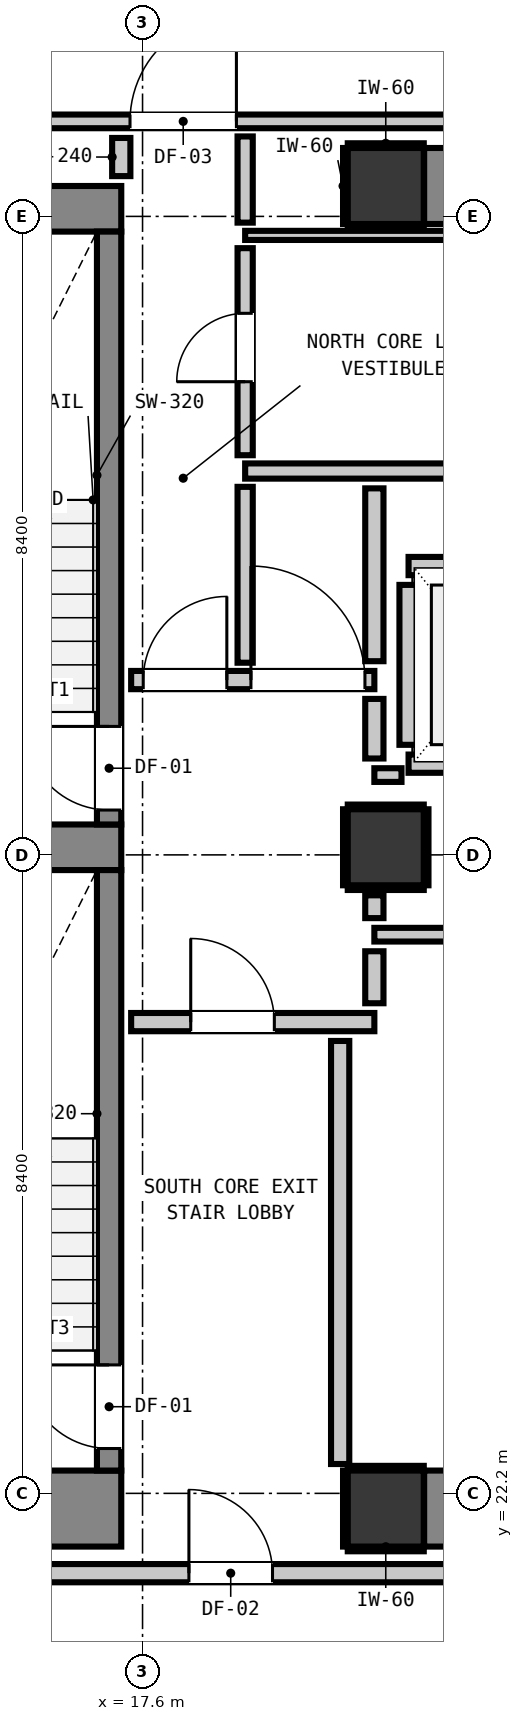
"""IFC4 building model, lengths in metres.
Left out: names, types, materials, properties, quantities, classifications, styles, units other than length and angle.
Written with IfcOpenShell. Run it as: python <this file> out.ifc"""

import sys

from ifc_helpers import new_model, si_unit, direction, frame, frame_2d, origin, origin_2d, place, context, subcontext, project, spatial, rectangle, extrude, element, fill, save


model = new_model("IFC4")
c1 = context("Model", 3, precision=1e-05, world=origin(), true_north=direction((0.0, 1.0)))
c2 = subcontext(c1, "Body", "Model", "MODEL_VIEW")
j1 = project(units=[si_unit("LENGTHUNIT", "METRE"), si_unit("PLANEANGLEUNIT", "RADIAN")], contexts=[c1])
p1 = place(None, origin())
s1 = spatial("IfcSite", under=j1, at=p1, CompositionType="ELEMENT")
p2 = place(p1, origin())
s2 = spatial("IfcBuilding", under=s1, at=p2, CompositionType="ELEMENT")
p3 = place(p2, frame((0.0, 0.0, 129.32)))
s3 = spatial("IfcBuildingStorey", under=s2, at=p3, CompositionType="ELEMENT", Elevation=129.32)
for number, where, z_axis, x_axis in (
    (1, (20.8, 22.0, 0.0), (0.0, 0.0, 1.0), (1.0, 0.0, 0.0)),
    (2, (20.8, 39.4, 0.0), (0.0, 0.0, 1.0), (1.0, 0.0, 0.0)),
):
    element("IfcColumn", number, at=place(p3, frame(where, z_axis=z_axis, x_axis=x_axis)), inside=s3, PredefinedType="COLUMN", context=c2, shape_type="SweptSolid", body=[
        extrude(rectangle(XDim=1.0, YDim=1.0, at=origin_2d()), origin(), (0.0, 0.0, 1.0), 3.32),
    ])
p4 = place(p3, frame((13.24, 22.0, 0.0), z_axis=(0.0, 0.0, 1.0), x_axis=(1.0, 0.0, 0.0)))
e3 = element("IfcWall", 3, at=p4, inside=s3, PredefinedType="SHEAR", context=c2, shape_type="SweptSolid", body=[
    extrude(rectangle(XDim=4.08, YDim=1.0, at=frame_2d((2.04, 0.0))), origin(), (0.0, 0.0, 1.0), 3.32),
])
p5 = place(p3, frame((13.24, 39.1, 0.0), z_axis=(0.0, 0.0, 1.0), x_axis=(1.0, 0.0, 0.0)))
e4 = element("IfcWall", 4, at=p5, inside=s3, PredefinedType="SHEAR", context=c2, shape_type="SweptSolid", body=[
    extrude(rectangle(XDim=4.08, YDim=0.6, at=frame_2d((2.04, 0.0))), origin(), (0.0, 0.0, 1.0), 3.32),
])
p6 = place(p3, frame((13.905, 30.7, 0.0), z_axis=(0.0, 0.0, 1.0), x_axis=(1.0, 0.0, 0.0)))
e5 = element("IfcWall", 5, at=p6, inside=s3, PredefinedType="SHEAR", context=c2, shape_type="SweptSolid", body=[
    extrude(rectangle(XDim=3.415, YDim=0.6, at=frame_2d((1.708, 0.0))), origin(), (0.0, 0.0, 1.0), 3.32),
])
for number, where, z_axis, x_axis in (
    (6, (21.305, 22.0, 0.0), (0.0, 0.0, 1.0), (1.0, 0.0, 0.0)),
    (7, (21.305, 39.4, 0.0), (0.0, 0.0, 1.0), (1.0, 0.0, 0.0)),
):
    element("IfcWall", number, at=place(p3, frame(where, z_axis=z_axis, x_axis=x_axis)), inside=s3, PredefinedType="SHEAR", context=c2, shape_type="SweptSolid", body=[
        extrude(rectangle(XDim=7.39, YDim=1.0, at=frame_2d((3.695, 0.0))), origin(), (0.0, 0.0, 1.0), 3.32),
    ])
p7 = place(p3, frame((17.16, 31.0, 0.0), z_axis=(0.0, 0.0, 1.0), x_axis=(0.0, 1.0, 0.0)))
e8 = element("IfcWall", 8, at=p7, inside=s3, PredefinedType="SHEAR", context=c2, shape_type="SweptSolid", body=[
    extrude(rectangle(XDim=7.8, YDim=0.32, at=frame_2d((3.9, 0.0))), origin(), (0.0, 0.0, 1.0), 3.32),
])
p8 = place(p7, frame((0.19, 0.0, 0.0)))
e9 = element("IfcOpeningElement", 9, at=p8, cuts=e8, PredefinedType="OPENING", context=c2, shape_type="SweptSolid", body=[
    extrude(rectangle(XDim=1.1, YDim=2.15, at=frame_2d((0.55, 1.075))), frame((0.0, 0.17, 0.0), z_axis=(0.0, -1.0, 0.0), x_axis=(1.0, 0.0, 0.0)), (0.0, 0.0, 1.0), 0.34),
])
p9 = place(p3, frame((17.16, 22.5, 0.0), z_axis=(0.0, 0.0, 1.0), x_axis=(0.0, 1.0, 0.0)))
e10 = element("IfcWall", 10, at=p9, inside=s3, PredefinedType="SHEAR", context=c2, shape_type="SweptSolid", body=[
    extrude(rectangle(XDim=7.9, YDim=0.32, at=frame_2d((3.95, 0.0))), origin(), (0.0, 0.0, 1.0), 3.32),
])
p10 = place(p9, frame((0.29, 0.0, 0.0)))
e11 = element("IfcOpeningElement", 11, at=p10, cuts=e10, PredefinedType="OPENING", context=c2, shape_type="SweptSolid", body=[
    extrude(rectangle(XDim=1.1, YDim=2.15, at=frame_2d((0.55, 1.075))), frame((0.0, 0.17, 0.0), z_axis=(0.0, -1.0, 0.0), x_axis=(1.0, 0.0, 0.0)), (0.0, 0.0, 1.0), 0.34),
])
p11 = place(p3, frame((20.8, 30.7, 0.0), z_axis=(0.0, 0.0, 1.0), x_axis=(1.0, 0.0, 0.0)))
e12 = element("IfcColumn", 12, at=p11, inside=s3, PredefinedType="COLUMN", context=c2, shape_type="SweptSolid", body=[
    extrude(rectangle(XDim=1.0, YDim=1.0, at=origin_2d()), origin(), (0.0, 0.0, 1.0), 3.32),
])
for number, where, z_axis, x_axis in (
    (13, (21.1, 31.8, 0.0), (0.0, 0.0, 1.0), (1.0, 0.0, 0.0)),
    (14, (21.1, 34.4, 0.0), (0.0, 0.0, 1.0), (1.0, 0.0, 0.0)),
):
    element("IfcWall", number, at=place(p3, frame(where, z_axis=z_axis, x_axis=x_axis)), inside=s3, PredefinedType="PARTITIONING", context=c2, shape_type="SweptSolid", body=[
        extrude(rectangle(XDim=2.2, YDim=0.24, at=frame_2d((1.1, 0.0))), origin(), (0.0, 0.0, 1.0), 3.08),
    ])
p12 = place(p3, frame((21.1, 32.048, 0.0), z_axis=(0.0, 0.0, 1.0), x_axis=(0.0, 1.0, 0.0)))
e15 = element("IfcWall", 15, at=p12, inside=s3, PredefinedType="PARTITIONING", context=c2, shape_type="SweptSolid", body=[
    extrude(rectangle(XDim=2.104, YDim=0.24, at=frame_2d((1.052, 0.0))), origin(), (0.0, 0.0, 1.0), 2.315),
])
p13 = place(p3, frame((9.407, 21.15, 0.0), z_axis=(0.0, 0.0, 1.0), x_axis=(1.0, 0.0, 0.0)))
e16 = element("IfcWall", 16, at=p13, inside=s3, PredefinedType="PARTITIONING", context=c2, shape_type="SweptSolid", body=[
    extrude(rectangle(XDim=39.386, YDim=0.24, at=frame_2d((19.693, 0.0))), origin(), (0.0, 0.0, 1.0), 3.08),
])
p14 = place(p13, frame((8.803, 0.0, 0.0)))
e17 = element("IfcOpeningElement", 17, at=p14, cuts=e16, PredefinedType="OPENING", context=c2, shape_type="SweptSolid", body=[
    extrude(rectangle(XDim=1.1, YDim=2.15, at=frame_2d((0.55, 1.075))), frame((0.0, 0.13, 0.0), z_axis=(0.0, -1.0, 0.0), x_axis=(1.0, 0.0, 0.0)), (0.0, 0.0, 1.0), 0.26),
])
p15 = place(p13, frame((1.192, 0.0, 0.0)))
e18 = element("IfcOpeningElement", 18, at=p15, cuts=e16, PredefinedType="OPENING", context=c2, shape_type="SweptSolid", body=[
    extrude(rectangle(XDim=1.4, YDim=2.15, at=frame_2d((0.7, 1.075))), frame((0.0, 0.13, 0.0), z_axis=(0.0, -1.0, 0.0), x_axis=(1.0, 0.0, 0.0)), (0.0, 0.0, 1.0), 0.26),
])
p16 = place(p13, frame((28.643, 0.0, 0.0)))
e19 = element("IfcOpeningElement", 19, at=p16, cuts=e16, PredefinedType="OPENING", context=c2, shape_type="SweptSolid", body=[
    extrude(rectangle(XDim=1.4, YDim=2.15, at=frame_2d((0.7, 1.075))), frame((0.0, 0.13, 0.0), z_axis=(0.0, -1.0, 0.0), x_axis=(1.0, 0.0, 0.0)), (0.0, 0.0, 1.0), 0.26),
])
p17 = place(p3, frame((17.45, 28.4, 0.0), z_axis=(0.0, 0.0, 1.0), x_axis=(1.0, 0.0, 0.0)))
e20 = element("IfcWall", 20, at=p17, inside=s3, PredefinedType="PARTITIONING", context=c2, shape_type="SweptSolid", body=[
    extrude(rectangle(XDim=3.2, YDim=0.24, at=frame_2d((1.6, 0.0))), origin(), (0.0, 0.0, 1.0), 3.08),
])
p18 = place(p17, frame((0.784, 0.0, 0.0)))
e21 = element("IfcOpeningElement", 21, at=p18, cuts=e20, PredefinedType="OPENING", context=c2, shape_type="SweptSolid", body=[
    extrude(rectangle(XDim=1.1, YDim=2.15, at=frame_2d((0.55, 1.075))), frame((0.0, 0.13, 0.0), z_axis=(0.0, -1.0, 0.0), x_axis=(1.0, 0.0, 0.0)), (0.0, 0.0, 1.0), 0.26),
])
p19 = place(p3, frame((17.45, 32.9, 0.0), z_axis=(0.0, 0.0, 1.0), x_axis=(1.0, 0.0, 0.0)))
e22 = element("IfcWall", 22, at=p19, inside=s3, PredefinedType="PARTITIONING", context=c2, shape_type="SweptSolid", body=[
    extrude(rectangle(XDim=3.2, YDim=0.24, at=frame_2d((1.6, 0.0))), origin(), (0.0, 0.0, 1.0), 3.08),
])
p20 = place(p19, frame((0.159, 0.0, 0.0)))
e23 = element("IfcOpeningElement", 23, at=p20, cuts=e22, PredefinedType="OPENING", context=c2, shape_type="SweptSolid", body=[
    extrude(rectangle(XDim=1.1, YDim=2.15, at=frame_2d((0.55, 1.075))), frame((0.0, 0.13, 0.0), z_axis=(0.0, -1.0, 0.0), x_axis=(1.0, 0.0, 0.0)), (0.0, 0.0, 1.0), 0.26),
])
p21 = place(p19, frame((1.576, 0.0, 0.0)))
e24 = element("IfcOpeningElement", 24, at=p21, cuts=e22, PredefinedType="OPENING", context=c2, shape_type="SweptSolid", body=[
    extrude(rectangle(XDim=1.5, YDim=2.15, at=frame_2d((0.75, 1.075))), frame((0.0, 0.13, 0.0), z_axis=(0.0, -1.0, 0.0), x_axis=(1.0, 0.0, 0.0)), (0.0, 0.0, 1.0), 0.26),
])
p22 = place(p3, frame((18.95, 35.65, 0.0), z_axis=(0.0, 0.0, 1.0), x_axis=(1.0, 0.0, 0.0)))
e25 = element("IfcWall", 25, at=p22, inside=s3, PredefinedType="PARTITIONING", context=c2, shape_type="SweptSolid", body=[
    extrude(rectangle(XDim=11.025, YDim=0.2, at=frame_2d((5.513, 0.0))), origin(), (0.0, 0.0, 1.0), 3.08),
])
p23 = place(p3, frame((20.65, 29.55, 0.0), z_axis=(0.0, 0.0, 1.0), x_axis=(1.0, 0.0, 0.0)))
e26 = element("IfcWall", 26, at=p23, inside=s3, PredefinedType="PARTITIONING", context=c2, shape_type="SweptSolid", body=[
    extrude(rectangle(XDim=9.325, YDim=0.18, at=frame_2d((4.663, 0.0))), origin(), (0.0, 0.0, 1.0), 3.08),
])
p24 = place(p3, frame((20.65, 31.65, 0.0), z_axis=(0.0, 0.0, 1.0), x_axis=(1.0, 0.0, 0.0)))
e27 = element("IfcWall", 27, at=p24, inside=s3, PredefinedType="PARTITIONING", context=c2, shape_type="SweptSolid", body=[
    extrude(rectangle(XDim=0.357, YDim=0.18, at=frame_2d((0.179, 0.0))), origin(), (0.0, 0.0, 1.0), 3.08),
])
p25 = place(p3, frame((9.407, 40.25, 0.0), z_axis=(0.0, 0.0, 1.0), x_axis=(1.0, 0.0, 0.0)))
e28 = element("IfcWall", 28, at=p25, inside=s3, PredefinedType="PARTITIONING", context=c2, shape_type="SweptSolid", body=[
    extrude(rectangle(XDim=27.536, YDim=0.18, at=frame_2d((13.768, 0.0))), origin(), (0.0, 0.0, 1.0), 3.08),
])
p26 = place(p25, frame((8.028, 0.0, 0.0)))
e29 = element("IfcOpeningElement", 29, at=p26, cuts=e28, PredefinedType="OPENING", context=c2, shape_type="SweptSolid", body=[
    extrude(rectangle(XDim=1.4, YDim=2.15, at=frame_2d((0.7, 1.075))), frame((0.0, 0.1, 0.0), z_axis=(0.0, -1.0, 0.0), x_axis=(1.0, 0.0, 0.0)), (0.0, 0.0, 1.0), 0.2),
])
p27 = place(p25, frame((1.192, 0.0, 0.0)))
e30 = element("IfcOpeningElement", 30, at=p27, cuts=e28, PredefinedType="OPENING", context=c2, shape_type="SweptSolid", body=[
    extrude(rectangle(XDim=1.4, YDim=2.15, at=frame_2d((0.7, 1.075))), frame((0.0, 0.1, 0.0), z_axis=(0.0, -1.0, 0.0), x_axis=(1.0, 0.0, 0.0)), (0.0, 0.0, 1.0), 0.2),
])
p28 = place(p3, frame((18.95, 38.75, 0.0), z_axis=(0.0, 0.0, 1.0), x_axis=(1.0, 0.0, 0.0)))
e31 = element("IfcWall", 31, at=p28, inside=s3, PredefinedType="PARTITIONING", context=c2, shape_type="SweptSolid", body=[
    extrude(rectangle(XDim=13.56, YDim=0.12, at=frame_2d((6.78, 0.0))), origin(), (0.0, 0.0, 1.0), 3.08),
])
p29 = place(p3, frame((17.32, 39.53, 0.0), z_axis=(0.0, 0.0, 1.0), x_axis=(0.0, 1.0, 0.0)))
e32 = element("IfcWall", 32, at=p29, inside=s3, PredefinedType="PARTITIONING", context=c2, shape_type="SweptSolid", body=[
    extrude(rectangle(XDim=0.502, YDim=0.24, at=frame_2d((0.251, 0.0))), origin(), (0.0, 0.0, 1.0), 3.08),
])
p30 = place(p3, frame((20.2, 22.586, 0.0), z_axis=(0.0, 0.0, 1.0), x_axis=(0.0, 1.0, 0.0)))
e33 = element("IfcWall", 33, at=p30, inside=s3, PredefinedType="PARTITIONING", context=c2, shape_type="SweptSolid", body=[
    extrude(rectangle(XDim=5.566, YDim=0.24, at=frame_2d((2.783, 0.0))), origin(), (0.0, 0.0, 1.0), 3.08),
])
p31 = place(p3, frame((20.65, 28.648, 0.0), z_axis=(0.0, 0.0, 1.0), x_axis=(0.0, 1.0, 0.0)))
e34 = element("IfcWall", 34, at=p31, inside=s3, PredefinedType="PARTITIONING", context=c2, shape_type="SweptSolid", body=[
    extrude(rectangle(XDim=0.684, YDim=0.24, at=frame_2d((0.342, 0.0))), origin(), (0.0, 0.0, 1.0), 2.315),
])
p32 = place(p3, frame((20.65, 29.768, 0.0), z_axis=(0.0, 0.0, 1.0), x_axis=(0.0, 1.0, 0.0)))
e35 = element("IfcWall", 35, at=p32, inside=s3, PredefinedType="PARTITIONING", context=c2, shape_type="SweptSolid", body=[
    extrude(rectangle(XDim=0.3, YDim=0.24, at=frame_2d((0.15, 0.0))), origin(), (0.0, 0.0, 1.0), 2.315),
])
p33 = place(p3, frame((20.65, 31.868, 0.0), z_axis=(0.0, 0.0, 1.0), x_axis=(0.0, 1.0, 0.0)))
e36 = element("IfcWall", 36, at=p33, inside=s3, PredefinedType="PARTITIONING", context=c2, shape_type="SweptSolid", body=[
    extrude(rectangle(XDim=0.784, YDim=0.24, at=frame_2d((0.392, 0.0))), origin(), (0.0, 0.0, 1.0), 2.315),
])
p34 = place(p3, frame((20.65, 33.148, 0.0), z_axis=(0.0, 0.0, 1.0), x_axis=(0.0, 1.0, 0.0)))
e37 = element("IfcWall", 37, at=p34, inside=s3, PredefinedType="PARTITIONING", context=c2, shape_type="SweptSolid", body=[
    extrude(rectangle(XDim=2.274, YDim=0.24, at=frame_2d((1.137, 0.0))), origin(), (0.0, 0.0, 1.0), 2.315),
])
p35 = place(p3, frame((18.95, 33.128, 0.0), z_axis=(0.0, 0.0, 1.0), x_axis=(0.0, 1.0, 0.0)))
e38 = element("IfcWall", 38, at=p35, inside=s3, PredefinedType="PARTITIONING", context=c2, shape_type="SweptSolid", body=[
    extrude(rectangle(XDim=2.314, YDim=0.2, at=frame_2d((1.157, 0.0))), origin(), (0.0, 0.0, 1.0), 3.08),
])
p36 = place(p3, frame((18.95, 35.858, 0.0), z_axis=(0.0, 0.0, 1.0), x_axis=(0.0, 1.0, 0.0)))
e39 = element("IfcWall", 39, at=p36, inside=s3, PredefinedType="PARTITIONING", context=c2, shape_type="SweptSolid", body=[
    extrude(rectangle(XDim=2.724, YDim=0.2, at=frame_2d((1.362, 0.0))), origin(), (0.0, 0.0, 1.0), 3.08),
])
p37 = place(p36, frame((0.967, 0.0, 0.0)))
e40 = element("IfcOpeningElement", 40, at=p37, cuts=e39, PredefinedType="OPENING", context=c2, shape_type="SweptSolid", body=[
    extrude(rectangle(XDim=0.9, YDim=2.1, at=frame_2d((0.45, 1.05))), frame((0.0, 0.11, 0.0), z_axis=(0.0, -1.0, 0.0), x_axis=(1.0, 0.0, 0.0)), (0.0, 0.0, 1.0), 0.22),
])
p38 = place(p3, frame((18.95, 38.918, 0.0), z_axis=(0.0, 0.0, 1.0), x_axis=(0.0, 1.0, 0.0)))
e41 = element("IfcWall", 41, at=p38, inside=s3, PredefinedType="PARTITIONING", context=c2, shape_type="SweptSolid", body=[
    extrude(rectangle(XDim=1.134, YDim=0.2, at=frame_2d((0.567, 0.0))), origin(), (0.0, 0.0, 1.0), 3.08),
])
for number, where, z_axis, x_axis in (
    (42, (20.3, 21.468, 0.0), (0.0, 0.0, 1.0), (1.0, 0.0, 0.0)),
    (43, (20.3, 22.532, 0.0), (0.0, 0.0, 1.0), (1.0, 0.0, 0.0)),
    (44, (20.268, 21.5, 0.0), (0.0, 0.0, 1.0), (0.0, 1.0, 0.0)),
    (45, (20.3, 38.868, 0.0), (0.0, 0.0, 1.0), (1.0, 0.0, 0.0)),
    (46, (20.3, 39.932, 0.0), (0.0, 0.0, 1.0), (1.0, 0.0, 0.0)),
    (47, (20.268, 38.9, 0.0), (0.0, 0.0, 1.0), (0.0, 1.0, 0.0)),
    (48, (20.3, 30.168, 0.0), (0.0, 0.0, 1.0), (1.0, 0.0, 0.0)),
    (49, (20.3, 31.232, 0.0), (0.0, 0.0, 1.0), (1.0, 0.0, 0.0)),
    (50, (20.268, 30.2, 0.0), (0.0, 0.0, 1.0), (0.0, 1.0, 0.0)),
    (51, (21.332, 30.2, 0.0), (0.0, 0.0, 1.0), (0.0, 1.0, 0.0)),
):
    element("IfcWall", number, at=place(p3, frame(where, z_axis=z_axis, x_axis=x_axis)), inside=s3, PredefinedType="PARTITIONING", context=c2, shape_type="SweptSolid", body=[
        extrude(rectangle(XDim=1.0, YDim=0.06, at=frame_2d((0.5, 0.0))), origin(), (0.0, 0.0, 1.0), 1.45),
    ])
p39 = place(p8, origin())
e52 = element("IfcDoor", 52, at=p39, inside=s3, OperationType="SINGLE_SWING_RIGHT", PredefinedType="DOOR", context=c2, shape_type="SweptSolid", body=[
    extrude(rectangle(XDim=1.1, YDim=2.15, at=frame_2d((0.55, 1.075))), frame((0.0, 0.025, 0.0), z_axis=(0.0, -1.0, 0.0), x_axis=(1.0, 0.0, 0.0)), (0.0, 0.0, 1.0), 0.05),
])
fill(e9, e52)
p40 = place(p10, origin())
e53 = element("IfcDoor", 53, at=p40, inside=s3, OperationType="SINGLE_SWING_RIGHT", PredefinedType="DOOR", context=c2, shape_type="SweptSolid", body=[
    extrude(rectangle(XDim=1.1, YDim=2.15, at=frame_2d((0.55, 1.075))), frame((0.0, 0.025, 0.0), z_axis=(0.0, -1.0, 0.0), x_axis=(1.0, 0.0, 0.0)), (0.0, 0.0, 1.0), 0.05),
])
fill(e11, e53)
p41 = place(p18, origin())
e54 = element("IfcDoor", 54, at=p41, inside=s3, OperationType="SINGLE_SWING_LEFT", PredefinedType="DOOR", context=c2, shape_type="SweptSolid", body=[
    extrude(rectangle(XDim=1.1, YDim=2.15, at=frame_2d((0.55, 1.075))), frame((0.0, 0.025, 0.0), z_axis=(0.0, -1.0, 0.0), x_axis=(1.0, 0.0, 0.0)), (0.0, 0.0, 1.0), 0.05),
])
fill(e21, e54)
p42 = place(p20, origin())
e55 = element("IfcDoor", 55, at=p42, inside=s3, OperationType="SINGLE_SWING_RIGHT", PredefinedType="DOOR", context=c2, shape_type="SweptSolid", body=[
    extrude(rectangle(XDim=1.1, YDim=2.15, at=frame_2d((0.55, 1.075))), frame((0.0, 0.025, 0.0), z_axis=(0.0, -1.0, 0.0), x_axis=(1.0, 0.0, 0.0)), (0.0, 0.0, 1.0), 0.05),
])
fill(e23, e55)
p43 = place(p14, origin())
e56 = element("IfcDoor", 56, at=p43, inside=s3, OperationType="SINGLE_SWING_LEFT", PredefinedType="DOOR", context=c2, shape_type="SweptSolid", body=[
    extrude(rectangle(XDim=1.1, YDim=2.15, at=frame_2d((0.55, 1.075))), frame((0.0, 0.025, 0.0), z_axis=(0.0, -1.0, 0.0), x_axis=(1.0, 0.0, 0.0)), (0.0, 0.0, 1.0), 0.05),
])
fill(e17, e56)
p44 = place(p26, origin())
e57 = element("IfcDoor", 57, at=p44, inside=s3, OperationType="SINGLE_SWING_RIGHT", PredefinedType="DOOR", context=c2, shape_type="SweptSolid", body=[
    extrude(rectangle(XDim=1.4, YDim=2.15, at=frame_2d((0.7, 1.075))), frame((0.0, 0.025, 0.0), z_axis=(0.0, -1.0, 0.0), x_axis=(1.0, 0.0, 0.0)), (0.0, 0.0, 1.0), 0.05),
])
fill(e29, e57)
p45 = place(p21, origin())
e58 = element("IfcDoor", 58, at=p45, inside=s3, OperationType="SINGLE_SWING_LEFT", PredefinedType="DOOR", context=c2, shape_type="SweptSolid", body=[
    extrude(rectangle(XDim=1.5, YDim=2.15, at=frame_2d((0.75, 1.075))), frame((0.0, 0.025, 0.0), z_axis=(0.0, -1.0, 0.0), x_axis=(1.0, 0.0, 0.0)), (0.0, 0.0, 1.0), 0.05),
])
fill(e24, e58)
p46 = place(p37, origin())
e59 = element("IfcDoor", 59, at=p46, inside=s3, OperationType="SINGLE_SWING_LEFT", PredefinedType="DOOR", context=c2, shape_type="SweptSolid", body=[
    extrude(rectangle(XDim=0.9, YDim=2.1, at=frame_2d((0.45, 1.05))), frame((0.0, 0.025, 0.0), z_axis=(0.0, -1.0, 0.0), x_axis=(1.0, 0.0, 0.0)), (0.0, 0.0, 1.0), 0.05),
])
fill(e40, e59)
save(model, sys.argv[1])
